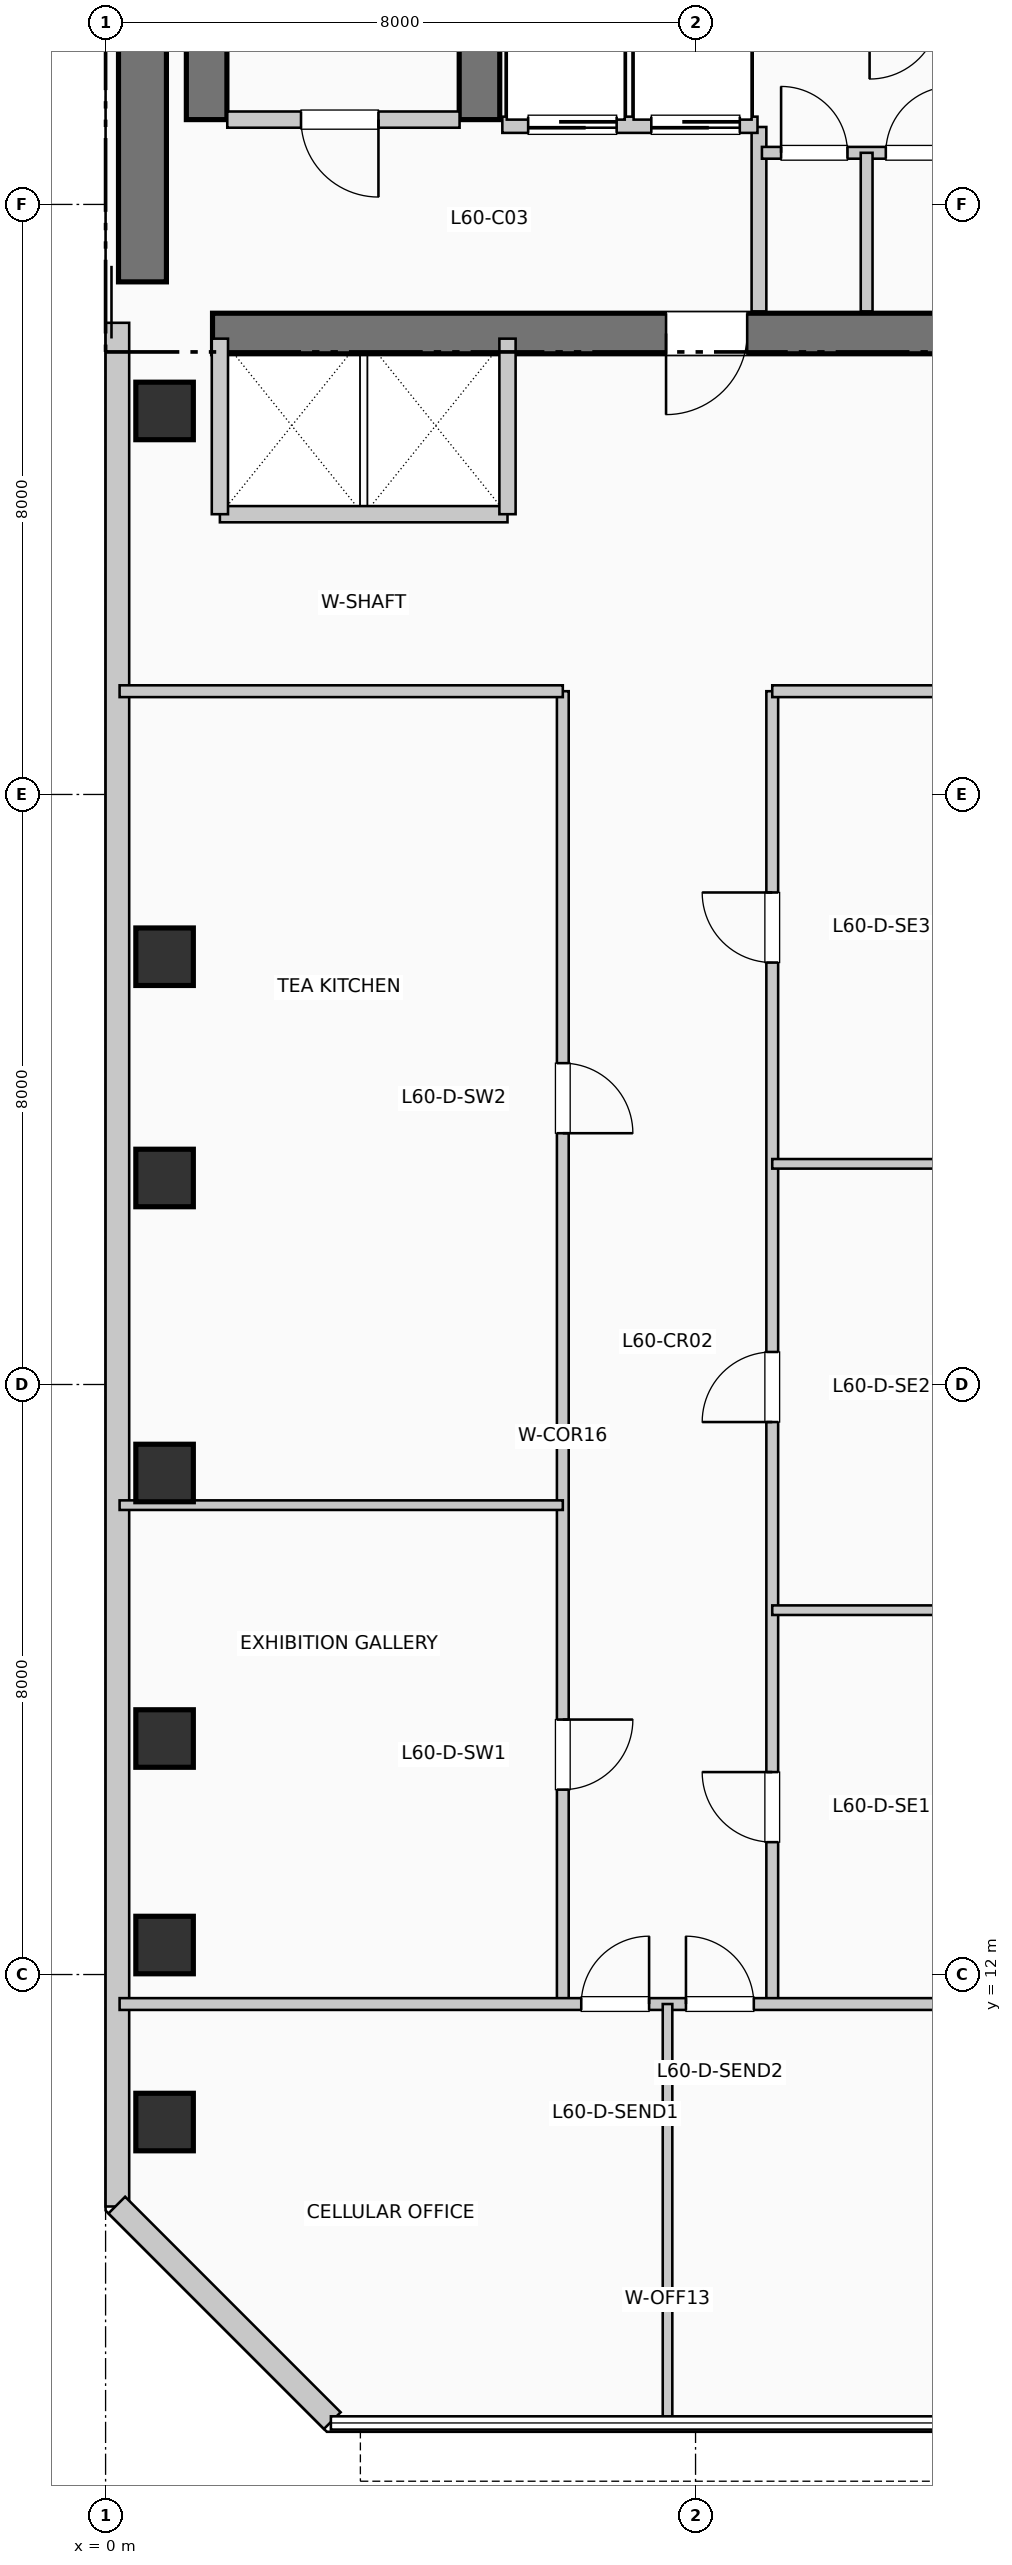
"""IFC4 building model, lengths in metres.
Left out: names, types, materials, properties, quantities, classifications, styles, units other than length and angle.
Written with IfcOpenShell. Run it as: python <this file> out.ifc"""

import sys

from ifc_helpers import new_model, si_unit, direction, frame, frame_2d, origin, origin_2d, place, context, subcontext, project, spatial, rectangle, extrude, element, fill, save


model = new_model("IFC4")
c1 = context("Model", 3, precision=1e-05, world=origin(), true_north=direction((0.0, 1.0)))
c2 = subcontext(c1, "Body", "Model", "MODEL_VIEW")
j1 = project(units=[si_unit("LENGTHUNIT", "METRE"), si_unit("PLANEANGLEUNIT", "RADIAN")], contexts=[c1])
p1 = place(None, origin())
s1 = spatial("IfcSite", under=j1, at=p1, CompositionType="ELEMENT")
p2 = place(p1, origin())
s2 = spatial("IfcBuilding", under=s1, at=p2, CompositionType="ELEMENT")
p3 = place(p2, frame((0.0, 0.0, 247.5)))
s3 = spatial("IfcBuildingStorey", under=s2, at=p3, CompositionType="ELEMENT", Elevation=247.5)
p4 = place(p3, frame((0.5, 34.95, 0.0), z_axis=(0.0, 0.0, 1.0), x_axis=(0.0, 1.0, 0.0)))
e1 = element("IfcWall", 1, at=p4, inside=s3, PredefinedType="SHEAR", context=c2, shape_type="SweptSolid", body=[
    extrude(rectangle(XDim=7.9, YDim=0.65, at=frame_2d((3.95, 0.0))), origin(), (0.0, 0.0, 1.0), 3.96),
])
p5 = place(p3, frame((1.45, 34.25, 0.0), z_axis=(0.0, 0.0, 1.0), x_axis=(1.0, 0.0, 0.0)))
e2 = element("IfcWall", 2, at=p5, inside=s3, PredefinedType="SHEAR", context=c2, shape_type="SweptSolid", body=[
    extrude(rectangle(XDim=10.71, YDim=0.55, at=frame_2d((5.355, 0.0))), origin(), (0.0, 0.0, 1.0), 3.96),
])
p6 = place(p5, frame((7.25, 0.0, 0.0), z_axis=(0.0, 0.0, 1.0), x_axis=(-1.0, 0.0, 0.0)))
e3 = element("IfcOpeningElement", 3, at=p6, cuts=e2, PredefinedType="OPENING", context=c2, shape_type="SweptSolid", body=[
    extrude(rectangle(XDim=1.1, YDim=2.15, at=frame_2d((0.55, 1.075))), frame((0.0, 0.285, 0.0), z_axis=(0.0, -1.0, 0.0), x_axis=(1.0, 0.0, 0.0)), (0.0, 0.0, 1.0), 0.57),
])
for number, where, z_axis, x_axis in (
    (4, (1.37, 37.15, 0.0), (0.0, 0.0, 1.0), (0.0, 1.0, 0.0)),
    (5, (5.07, 37.15, 0.0), (0.0, 0.0, 1.0), (0.0, 1.0, 0.0)),
):
    element("IfcWall", number, at=place(p3, frame(where, z_axis=z_axis, x_axis=x_axis)), inside=s3, PredefinedType="SHEAR", context=c2, shape_type="SweptSolid", body=[
        extrude(rectangle(XDim=7.89, YDim=0.55, at=frame_2d((3.945, 0.0))), origin(), (0.0, 0.0, 1.0), 3.96),
    ])
for number, where, z_axis, x_axis in (
    (6, (0.8, 10.0, 0.0), (0.0, 0.0, 1.0), (1.0, 0.0, 0.0)),
    (7, (0.8, 12.4, 0.0), (0.0, 0.0, 1.0), (1.0, 0.0, 0.0)),
    (8, (0.8, 15.2, 0.0), (0.0, 0.0, 1.0), (1.0, 0.0, 0.0)),
    (9, (0.8, 18.8, 0.0), (0.0, 0.0, 1.0), (1.0, 0.0, 0.0)),
    (10, (0.8, 22.8, 0.0), (0.0, 0.0, 1.0), (1.0, 0.0, 0.0)),
    (11, (0.8, 25.8, 0.0), (0.0, 0.0, 1.0), (1.0, 0.0, 0.0)),
    (12, (0.8, 33.2, 0.0), (0.0, 0.0, 1.0), (1.0, 0.0, 0.0)),
):
    element("IfcColumn", number, at=place(p3, frame(where, z_axis=z_axis, x_axis=x_axis)), inside=s3, PredefinedType="COLUMN", context=c2, shape_type="SweptSolid", body=[
        extrude(rectangle(XDim=0.78, YDim=0.78, at=origin_2d()), origin(), (0.0, 0.0, 1.0), 3.96),
    ])
p7 = place(p3, frame((0.16, 34.395, 0.0), z_axis=(0.0, 0.0, 1.0), x_axis=(0.0, -1.0, 0.0)))
e13 = element("IfcWall", 13, at=p7, inside=s3, PredefinedType="SOLIDWALL", context=c2, shape_type="SweptSolid", body=[
    extrude(rectangle(XDim=25.54, YDim=0.32, at=frame_2d((12.77, 0.0))), origin(), (0.0, 0.0, 1.0), 3.54),
])
p8 = place(p3, frame((0.152, 8.874, 0.0), z_axis=(0.0, 0.0, 1.0), x_axis=(0.707077242712, -0.707136318428, 0.0)))
e14 = element("IfcWall", 14, at=p8, inside=s3, PredefinedType="SOLIDWALL", context=c2, shape_type="SweptSolid", body=[
    extrude(rectangle(XDim=4.133, YDim=0.32, at=frame_2d((2.066, 0.0))), origin(), (0.0, 0.0, 1.0), 3.54),
])
p9 = place(p3, frame((1.65, 37.15, 0.0), z_axis=(0.0, 0.0, 1.0), x_axis=(1.0, 0.0, 0.0)))
e15 = element("IfcWall", 15, at=p9, inside=s3, PredefinedType="PARTITIONING", context=c2, shape_type="SweptSolid", body=[
    extrude(rectangle(XDim=3.15, YDim=0.22, at=frame_2d((1.575, 0.0))), origin(), (0.0, 0.0, 1.0), 3.54),
])
p10 = place(p9, frame((2.05, 0.0, 0.0), z_axis=(0.0, 0.0, 1.0), x_axis=(-1.0, 0.0, 0.0)))
e16 = element("IfcOpeningElement", 16, at=p10, cuts=e15, PredefinedType="OPENING", context=c2, shape_type="SweptSolid", body=[
    extrude(rectangle(XDim=1.05, YDim=2.15, at=frame_2d((0.525, 1.075))), frame((0.0, 0.12, 0.0), z_axis=(0.0, -1.0, 0.0), x_axis=(1.0, 0.0, 0.0)), (0.0, 0.0, 1.0), 0.24),
])
p11 = place(p3, frame((8.86, 34.55, 0.0), z_axis=(0.0, 0.0, 1.0), x_axis=(0.0, 1.0, 0.0)))
e17 = element("IfcWall", 17, at=p11, inside=s3, PredefinedType="PARTITIONING", context=c2, shape_type="SweptSolid", body=[
    extrude(rectangle(XDim=2.5, YDim=0.2, at=frame_2d((1.25, 0.0))), origin(), (0.0, 0.0, 1.0), 3.54),
])
p12 = place(p3, frame((5.38, 37.08, 0.0), z_axis=(0.0, 0.0, 1.0), x_axis=(1.0, 0.0, 0.0)))
e18 = element("IfcWall", 18, at=p12, inside=s3, PredefinedType="PARTITIONING", context=c2, shape_type="SweptSolid", body=[
    extrude(rectangle(XDim=3.46, YDim=0.22, at=frame_2d((1.73, 0.0))), origin(), (0.0, 0.0, 1.0), 3.54),
])
p13 = place(p12, frame((1.55, 0.0, 0.0), z_axis=(0.0, 0.0, 1.0), x_axis=(-1.0, 0.0, 0.0)))
e19 = element("IfcOpeningElement", 19, at=p13, cuts=e18, PredefinedType="OPENING", context=c2, shape_type="SweptSolid", body=[
    extrude(rectangle(XDim=1.2, YDim=2.2, at=frame_2d((0.6, 1.1))), frame((0.0, 0.12, 0.0), z_axis=(0.0, -1.0, 0.0), x_axis=(1.0, 0.0, 0.0)), (0.0, 0.0, 1.0), 0.24),
])
p14 = place(p12, frame((3.22, 0.0, 0.0), z_axis=(0.0, 0.0, 1.0), x_axis=(-1.0, 0.0, 0.0)))
e20 = element("IfcOpeningElement", 20, at=p14, cuts=e18, PredefinedType="OPENING", context=c2, shape_type="SweptSolid", body=[
    extrude(rectangle(XDim=1.2, YDim=2.2, at=frame_2d((0.6, 1.1))), frame((0.0, 0.12, 0.0), z_axis=(0.0, -1.0, 0.0), x_axis=(1.0, 0.0, 0.0)), (0.0, 0.0, 1.0), 0.24),
])
p15 = place(p3, frame((1.55, 31.8, 0.0), z_axis=(0.0, 0.0, 1.0), x_axis=(1.0, 0.0, 0.0)))
e21 = element("IfcWall", 21, at=p15, inside=s3, PredefinedType="PARTITIONING", context=c2, shape_type="SweptSolid", body=[
    extrude(rectangle(XDim=3.9, YDim=0.22, at=frame_2d((1.95, 0.0))), origin(), (0.0, 0.0, 1.0), 3.54),
])
for number, where, z_axis, x_axis in (
    (22, (1.55, 31.8, 0.0), (0.0, 0.0, 1.0), (0.0, 1.0, 0.0)),
    (23, (5.45, 31.8, 0.0), (0.0, 0.0, 1.0), (0.0, 1.0, 0.0)),
):
    element("IfcWall", number, at=place(p3, frame(where, z_axis=z_axis, x_axis=x_axis)), inside=s3, PredefinedType="PARTITIONING", context=c2, shape_type="SweptSolid", body=[
        extrude(rectangle(XDim=2.38, YDim=0.22, at=frame_2d((1.19, 0.0))), origin(), (0.0, 0.0, 1.0), 3.54),
    ])
p16 = place(p3, frame((8.9, 36.7, 0.0), z_axis=(0.0, 0.0, 1.0), x_axis=(1.0, 0.0, 0.0)))
e24 = element("IfcWall", 24, at=p16, inside=s3, PredefinedType="PARTITIONING", context=c2, shape_type="SweptSolid", body=[
    extrude(rectangle(XDim=3.25, YDim=0.16, at=frame_2d((1.625, 0.0))), origin(), (0.0, 0.0, 1.0), 3.54),
])
p17 = place(p16, frame((0.26, 0.0, 0.0)))
e25 = element("IfcOpeningElement", 25, at=p17, cuts=e24, PredefinedType="OPENING", context=c2, shape_type="SweptSolid", body=[
    extrude(rectangle(XDim=0.9, YDim=2.15, at=frame_2d((0.45, 1.075))), frame((0.0, 0.09, 0.0), z_axis=(0.0, -1.0, 0.0), x_axis=(1.0, 0.0, 0.0)), (0.0, 0.0, 1.0), 0.18),
])
p18 = place(p16, frame((1.68, 0.0, 0.0)))
e26 = element("IfcOpeningElement", 26, at=p18, cuts=e24, PredefinedType="OPENING", context=c2, shape_type="SweptSolid", body=[
    extrude(rectangle(XDim=0.9, YDim=2.15, at=frame_2d((0.45, 1.075))), frame((0.0, 0.09, 0.0), z_axis=(0.0, -1.0, 0.0), x_axis=(1.0, 0.0, 0.0)), (0.0, 0.0, 1.0), 0.18),
])
p19 = place(p3, frame((10.32, 34.55, 0.0), z_axis=(0.0, 0.0, 1.0), x_axis=(0.0, 1.0, 0.0)))
e27 = element("IfcWall", 27, at=p19, inside=s3, PredefinedType="PARTITIONING", context=c2, shape_type="SweptSolid", body=[
    extrude(rectangle(XDim=2.15, YDim=0.16, at=frame_2d((1.075, 0.0))), origin(), (0.0, 0.0, 1.0), 3.54),
])
p20 = place(p3, frame((6.2, 11.6, 0.0), z_axis=(0.0, 0.0, 1.0), x_axis=(0.0, 1.0, 0.0)))
e28 = element("IfcWall", 28, at=p20, inside=s3, PredefinedType="PARTITIONING", context=c2, shape_type="SweptSolid", body=[
    extrude(rectangle(XDim=17.8, YDim=0.16, at=frame_2d((8.9, 0.0))), origin(), (0.0, 0.0, 1.0), 3.54),
])
p21 = place(p20, frame((3.857, 0.0, 0.0), z_axis=(0.0, 0.0, 1.0), x_axis=(-1.0, 0.0, 0.0)))
e29 = element("IfcOpeningElement", 29, at=p21, cuts=e28, PredefinedType="OPENING", context=c2, shape_type="SweptSolid", body=[
    extrude(rectangle(XDim=0.95, YDim=2.15, at=frame_2d((0.475, 1.075))), frame((0.0, 0.09, 0.0), z_axis=(0.0, -1.0, 0.0), x_axis=(1.0, 0.0, 0.0)), (0.0, 0.0, 1.0), 0.18),
])
p22 = place(p20, frame((12.757, 0.0, 0.0), z_axis=(0.0, 0.0, 1.0), x_axis=(-1.0, 0.0, 0.0)))
e30 = element("IfcOpeningElement", 30, at=p22, cuts=e28, PredefinedType="OPENING", context=c2, shape_type="SweptSolid", body=[
    extrude(rectangle(XDim=0.95, YDim=2.15, at=frame_2d((0.475, 1.075))), frame((0.0, 0.09, 0.0), z_axis=(0.0, -1.0, 0.0), x_axis=(1.0, 0.0, 0.0)), (0.0, 0.0, 1.0), 0.18),
])
p23 = place(p3, frame((9.04, 11.6, 0.0), z_axis=(0.0, 0.0, 1.0), x_axis=(0.0, 1.0, 0.0)))
e31 = element("IfcWall", 31, at=p23, inside=s3, PredefinedType="PARTITIONING", context=c2, shape_type="SweptSolid", body=[
    extrude(rectangle(XDim=17.8, YDim=0.16, at=frame_2d((8.9, 0.0))), origin(), (0.0, 0.0, 1.0), 3.54),
])
p24 = place(p23, frame((2.195, 0.0, 0.0)))
e32 = element("IfcOpeningElement", 32, at=p24, cuts=e31, PredefinedType="OPENING", context=c2, shape_type="SweptSolid", body=[
    extrude(rectangle(XDim=0.95, YDim=2.15, at=frame_2d((0.475, 1.075))), frame((0.0, 0.09, 0.0), z_axis=(0.0, -1.0, 0.0), x_axis=(1.0, 0.0, 0.0)), (0.0, 0.0, 1.0), 0.18),
])
p25 = place(p23, frame((7.891, 0.0, 0.0)))
e33 = element("IfcOpeningElement", 33, at=p25, cuts=e31, PredefinedType="OPENING", context=c2, shape_type="SweptSolid", body=[
    extrude(rectangle(XDim=0.95, YDim=2.15, at=frame_2d((0.475, 1.075))), frame((0.0, 0.09, 0.0), z_axis=(0.0, -1.0, 0.0), x_axis=(1.0, 0.0, 0.0)), (0.0, 0.0, 1.0), 0.18),
])
p26 = place(p23, frame((14.121, 0.0, 0.0)))
e34 = element("IfcOpeningElement", 34, at=p26, cuts=e31, PredefinedType="OPENING", context=c2, shape_type="SweptSolid", body=[
    extrude(rectangle(XDim=0.95, YDim=2.15, at=frame_2d((0.475, 1.075))), frame((0.0, 0.09, 0.0), z_axis=(0.0, -1.0, 0.0), x_axis=(1.0, 0.0, 0.0)), (0.0, 0.0, 1.0), 0.18),
])
p27 = place(p3, frame((0.19, 11.6, 0.0), z_axis=(0.0, 0.0, 1.0), x_axis=(1.0, 0.0, 0.0)))
e35 = element("IfcWall", 35, at=p27, inside=s3, PredefinedType="PARTITIONING", context=c2, shape_type="SweptSolid", body=[
    extrude(rectangle(XDim=23.26, YDim=0.16, at=frame_2d((11.63, 0.0))), origin(), (0.0, 0.0, 1.0), 3.54),
])
p28 = place(p27, frame((6.26, 0.0, 0.0)))
e36 = element("IfcOpeningElement", 36, at=p28, cuts=e35, PredefinedType="OPENING", context=c2, shape_type="SweptSolid", body=[
    extrude(rectangle(XDim=0.92, YDim=2.1, at=frame_2d((0.46, 1.05))), frame((0.0, 0.09, 0.0), z_axis=(0.0, -1.0, 0.0), x_axis=(1.0, 0.0, 0.0)), (0.0, 0.0, 1.0), 0.18),
])
p29 = place(p27, frame((7.68, 0.0, 0.0)))
e37 = element("IfcOpeningElement", 37, at=p29, cuts=e35, PredefinedType="OPENING", context=c2, shape_type="SweptSolid", body=[
    extrude(rectangle(XDim=0.92, YDim=2.1, at=frame_2d((0.46, 1.05))), frame((0.0, 0.09, 0.0), z_axis=(0.0, -1.0, 0.0), x_axis=(1.0, 0.0, 0.0)), (0.0, 0.0, 1.0), 0.18),
])
p30 = place(p3, frame((0.19, 29.4, 0.0), z_axis=(0.0, 0.0, 1.0), x_axis=(1.0, 0.0, 0.0)))
e38 = element("IfcWall", 38, at=p30, inside=s3, PredefinedType="PARTITIONING", context=c2, shape_type="SweptSolid", body=[
    extrude(rectangle(XDim=6.01, YDim=0.16, at=frame_2d((3.005, 0.0))), origin(), (0.0, 0.0, 1.0), 3.195),
])
p31 = place(p3, frame((9.04, 29.4, 0.0), z_axis=(0.0, 0.0, 1.0), x_axis=(1.0, 0.0, 0.0)))
e39 = element("IfcWall", 39, at=p31, inside=s3, PredefinedType="PARTITIONING", context=c2, shape_type="SweptSolid", body=[
    extrude(rectangle(XDim=14.41, YDim=0.16, at=frame_2d((7.205, 0.0))), origin(), (0.0, 0.0, 1.0), 3.195),
])
p32 = place(p3, frame((7.62, 5.99, 0.0), z_axis=(0.0, 0.0, 1.0), x_axis=(0.0, 1.0, 0.0)))
e40 = element("IfcWall", 40, at=p32, inside=s3, PredefinedType="PARTITIONING", context=c2, shape_type="SweptSolid", body=[
    extrude(rectangle(XDim=5.61, YDim=0.13, at=frame_2d((2.805, 0.0))), origin(), (0.0, 0.0, 1.0), 3.54),
])
p33 = place(p3, frame((0.19, 18.364, 0.0), z_axis=(0.0, 0.0, 1.0), x_axis=(1.0, 0.0, 0.0)))
e41 = element("IfcWall", 41, at=p33, inside=s3, PredefinedType="PARTITIONING", context=c2, shape_type="SweptSolid", body=[
    extrude(rectangle(XDim=6.01, YDim=0.13, at=frame_2d((3.005, 0.0))), origin(), (0.0, 0.0, 1.0), 2.925),
])
p34 = place(p3, frame((9.04, 16.94, 0.0), z_axis=(0.0, 0.0, 1.0), x_axis=(1.0, 0.0, 0.0)))
e42 = element("IfcWall", 42, at=p34, inside=s3, PredefinedType="PARTITIONING", context=c2, shape_type="SweptSolid", body=[
    extrude(rectangle(XDim=14.41, YDim=0.13, at=frame_2d((7.205, 0.0))), origin(), (0.0, 0.0, 1.0), 3.54),
])
p35 = place(p3, frame((9.04, 22.992, 0.0), z_axis=(0.0, 0.0, 1.0), x_axis=(1.0, 0.0, 0.0)))
e43 = element("IfcWall", 43, at=p35, inside=s3, PredefinedType="PARTITIONING", context=c2, shape_type="SweptSolid", body=[
    extrude(rectangle(XDim=14.41, YDim=0.13, at=frame_2d((7.205, 0.0))), origin(), (0.0, 0.0, 1.0), 2.925),
])
p36 = place(p10, origin())
e44 = element("IfcDoor", 44, at=p36, inside=s3, OperationType="SINGLE_SWING_RIGHT", PredefinedType="DOOR", context=c2, shape_type="SweptSolid", body=[
    extrude(rectangle(XDim=1.05, YDim=2.15, at=frame_2d((0.525, 1.075))), frame((0.0, 0.025, 0.0), z_axis=(0.0, -1.0, 0.0), x_axis=(1.0, 0.0, 0.0)), (0.0, 0.0, 1.0), 0.05),
])
fill(e16, e44)
p37 = place(p6, origin())
e45 = element("IfcDoor", 45, at=p37, inside=s3, OperationType="SINGLE_SWING_LEFT", PredefinedType="DOOR", context=c2, shape_type="SweptSolid", body=[
    extrude(rectangle(XDim=1.1, YDim=2.15, at=frame_2d((0.55, 1.075))), frame((0.0, 0.025, 0.0), z_axis=(0.0, -1.0, 0.0), x_axis=(1.0, 0.0, 0.0)), (0.0, 0.0, 1.0), 0.05),
])
fill(e3, e45)
p38 = place(p13, origin())
e46 = element("IfcDoor", 46, at=p38, inside=s3, OperationType="SLIDING_TO_RIGHT", PredefinedType="DOOR", context=c2, shape_type="SweptSolid", body=[
    extrude(rectangle(XDim=1.2, YDim=2.2, at=frame_2d((0.6, 1.1))), frame((0.0, 0.025, 0.0), z_axis=(0.0, -1.0, 0.0), x_axis=(1.0, 0.0, 0.0)), (0.0, 0.0, 1.0), 0.05),
])
fill(e19, e46)
p39 = place(p14, origin())
e47 = element("IfcDoor", 47, at=p39, inside=s3, OperationType="SLIDING_TO_RIGHT", PredefinedType="DOOR", context=c2, shape_type="SweptSolid", body=[
    extrude(rectangle(XDim=1.2, YDim=2.2, at=frame_2d((0.6, 1.1))), frame((0.0, 0.025, 0.0), z_axis=(0.0, -1.0, 0.0), x_axis=(1.0, 0.0, 0.0)), (0.0, 0.0, 1.0), 0.05),
])
fill(e20, e47)
p40 = place(p17, origin())
e48 = element("IfcDoor", 48, at=p40, inside=s3, OperationType="SINGLE_SWING_LEFT", PredefinedType="DOOR", context=c2, shape_type="SweptSolid", body=[
    extrude(rectangle(XDim=0.9, YDim=2.15, at=frame_2d((0.45, 1.075))), frame((0.0, 0.025, 0.0), z_axis=(0.0, -1.0, 0.0), x_axis=(1.0, 0.0, 0.0)), (0.0, 0.0, 1.0), 0.05),
])
fill(e25, e48)
p41 = place(p18, origin())
e49 = element("IfcDoor", 49, at=p41, inside=s3, OperationType="SINGLE_SWING_RIGHT", PredefinedType="DOOR", context=c2, shape_type="SweptSolid", body=[
    extrude(rectangle(XDim=0.9, YDim=2.15, at=frame_2d((0.45, 1.075))), frame((0.0, 0.025, 0.0), z_axis=(0.0, -1.0, 0.0), x_axis=(1.0, 0.0, 0.0)), (0.0, 0.0, 1.0), 0.05),
])
fill(e26, e49)
p42 = place(p28, origin())
e50 = element("IfcDoor", 50, at=p42, inside=s3, OperationType="SINGLE_SWING_RIGHT", PredefinedType="DOOR", context=c2, shape_type="SweptSolid", body=[
    extrude(rectangle(XDim=0.92, YDim=2.1, at=frame_2d((0.46, 1.05))), frame((0.0, 0.025, 0.0), z_axis=(0.0, -1.0, 0.0), x_axis=(1.0, 0.0, 0.0)), (0.0, 0.0, 1.0), 0.05),
])
fill(e36, e50)
p43 = place(p29, origin())
e51 = element("IfcDoor", 51, at=p43, inside=s3, OperationType="SINGLE_SWING_LEFT", PredefinedType="DOOR", context=c2, shape_type="SweptSolid", body=[
    extrude(rectangle(XDim=0.92, YDim=2.1, at=frame_2d((0.46, 1.05))), frame((0.0, 0.025, 0.0), z_axis=(0.0, -1.0, 0.0), x_axis=(1.0, 0.0, 0.0)), (0.0, 0.0, 1.0), 0.05),
])
fill(e37, e51)
p44 = place(p21, origin())
e52 = element("IfcDoor", 52, at=p44, inside=s3, OperationType="SINGLE_SWING_RIGHT", PredefinedType="DOOR", context=c2, shape_type="SweptSolid", body=[
    extrude(rectangle(XDim=0.95, YDim=2.15, at=frame_2d((0.475, 1.075))), frame((0.0, 0.025, 0.0), z_axis=(0.0, -1.0, 0.0), x_axis=(1.0, 0.0, 0.0)), (0.0, 0.0, 1.0), 0.05),
])
fill(e29, e52)
p45 = place(p22, origin())
e53 = element("IfcDoor", 53, at=p45, inside=s3, OperationType="SINGLE_SWING_LEFT", PredefinedType="DOOR", context=c2, shape_type="SweptSolid", body=[
    extrude(rectangle(XDim=0.95, YDim=2.15, at=frame_2d((0.475, 1.075))), frame((0.0, 0.025, 0.0), z_axis=(0.0, -1.0, 0.0), x_axis=(1.0, 0.0, 0.0)), (0.0, 0.0, 1.0), 0.05),
])
fill(e30, e53)
p46 = place(p24, origin())
e54 = element("IfcDoor", 54, at=p46, inside=s3, OperationType="SINGLE_SWING_RIGHT", PredefinedType="DOOR", context=c2, shape_type="SweptSolid", body=[
    extrude(rectangle(XDim=0.95, YDim=2.15, at=frame_2d((0.475, 1.075))), frame((0.0, 0.025, 0.0), z_axis=(0.0, -1.0, 0.0), x_axis=(1.0, 0.0, 0.0)), (0.0, 0.0, 1.0), 0.05),
])
fill(e32, e54)
p47 = place(p25, origin())
e55 = element("IfcDoor", 55, at=p47, inside=s3, OperationType="SINGLE_SWING_LEFT", PredefinedType="DOOR", context=c2, shape_type="SweptSolid", body=[
    extrude(rectangle(XDim=0.95, YDim=2.15, at=frame_2d((0.475, 1.075))), frame((0.0, 0.025, 0.0), z_axis=(0.0, -1.0, 0.0), x_axis=(1.0, 0.0, 0.0)), (0.0, 0.0, 1.0), 0.05),
])
fill(e33, e55)
p48 = place(p26, origin())
e56 = element("IfcDoor", 56, at=p48, inside=s3, OperationType="SINGLE_SWING_RIGHT", PredefinedType="DOOR", context=c2, shape_type="SweptSolid", body=[
    extrude(rectangle(XDim=0.95, YDim=2.15, at=frame_2d((0.475, 1.075))), frame((0.0, 0.025, 0.0), z_axis=(0.0, -1.0, 0.0), x_axis=(1.0, 0.0, 0.0)), (0.0, 0.0, 1.0), 0.05),
])
fill(e34, e56)
save(model, sys.argv[1])
